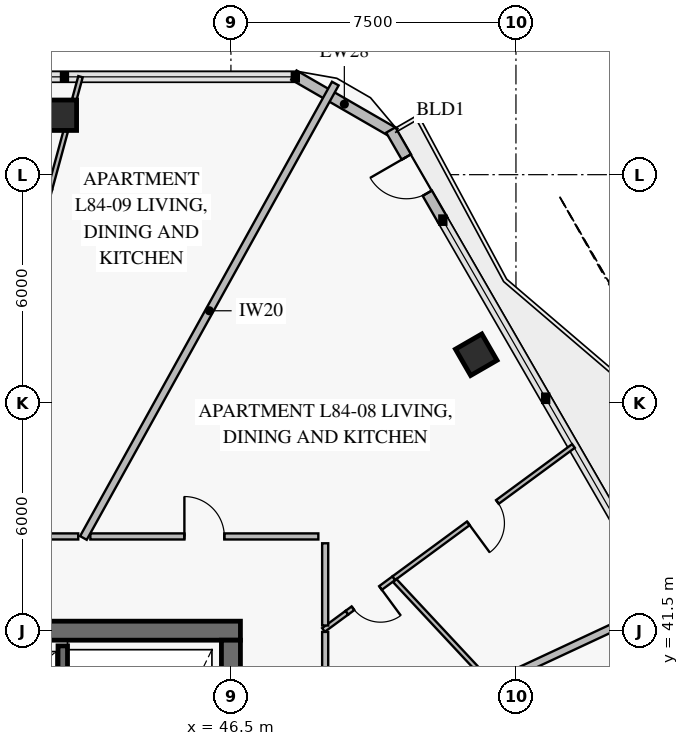
"""IFC4 building model, lengths in metres.
Left out: names, types, materials, properties, quantities, classifications, styles, units other than length and angle.
Written with IfcOpenShell. Run it as: python <this file> out.ifc"""

import sys

from ifc_helpers import new_model, si_unit, direction, frame, frame_2d, origin, origin_2d, place, context, subcontext, project, spatial, rectangle, extrude, element, fill, save


model = new_model("IFC4")
c1 = context("Model", 3, precision=1e-05, world=origin(), true_north=direction((0.0, 1.0)))
c2 = subcontext(c1, "Body", "Model", "MODEL_VIEW")
j1 = project(units=[si_unit("LENGTHUNIT", "METRE"), si_unit("PLANEANGLEUNIT", "RADIAN")], contexts=[c1])
p1 = place(None, origin())
s1 = spatial("IfcSite", under=j1, at=p1, CompositionType="ELEMENT")
p2 = place(p1, origin())
s2 = spatial("IfcBuilding", under=s1, at=p2, CompositionType="ELEMENT")
p3 = place(p2, frame((0.0, 0.0, 331.0)))
s3 = spatial("IfcBuildingStorey", under=s2, at=p3, CompositionType="ELEMENT", Elevation=331.0)
p4 = place(p3, frame((46.75, 41.5, 0.0), z_axis=(0.0, 0.0, 1.0), x_axis=(-1.0, 0.0, 0.0)))
e1 = element("IfcWall", 1, at=p4, inside=s3, PredefinedType="SHEAR", context=c2, shape_type="SweptSolid", body=[
    extrude(rectangle(XDim=7.8, YDim=0.5, at=frame_2d((3.9, 0.0))), origin(), (0.0, 0.0, 1.0), 3.8),
])
p5 = place(p3, frame((46.5, 22.75, 0.0), z_axis=(0.0, 0.0, 1.0), x_axis=(0.0, 1.0, 0.0)))
e2 = element("IfcWall", 2, at=p5, inside=s3, PredefinedType="SHEAR", context=c2, shape_type="SweptSolid", body=[
    extrude(rectangle(XDim=18.5, YDim=0.5, at=frame_2d((9.25, 0.0))), origin(), (0.0, 0.0, 1.0), 3.8),
])
p6 = place(p5, frame((9.0, 0.0, 0.0)))
e3 = element("IfcOpeningElement", 3, at=p6, cuts=e2, PredefinedType="OPENING", context=c2, shape_type="SweptSolid", body=[
    extrude(rectangle(XDim=1.1, YDim=2.15, at=frame_2d((0.55, 1.075))), frame((0.0, 0.262, 0.0), z_axis=(0.0, -1.0, 0.0), x_axis=(1.0, 0.0, 0.0)), (0.0, 0.0, 1.0), 0.524),
])
for number, where, z_axis, x_axis in (
    (4, (52.955, 48.762, 0.0), (0.0, 0.0, 1.0), (-0.5, 0.866, 0.0)),
    (5, (42.039, 55.064, 0.0), (0.0, 0.0, 1.0), (-1.0, 0.0, 0.0)),
):
    element("IfcColumn", number, at=place(p3, frame(where, z_axis=z_axis, x_axis=x_axis)), inside=s3, PredefinedType="COLUMN", context=c2, shape_type="SweptSolid", body=[
        extrude(rectangle(XDim=0.8, YDim=0.8, at=origin_2d()), origin(), (0.0, 0.0, 1.0), 3.55),
    ])
p7 = place(p3, frame((48.157, 56.122, 0.0), z_axis=(0.0, 0.0, 1.0), x_axis=(0.866023752521, -0.50000286006, 0.0)))
e6 = element("IfcWall", 6, at=p7, inside=s3, PredefinedType="SOLIDWALL", context=c2, shape_type="SweptSolid", body=[
    extrude(rectangle(XDim=3.065, YDim=0.28, at=frame_2d((1.532, 0.0))), origin(), (0.0, 0.0, 1.0), 3.55),
])
p8 = place(p3, frame((50.707, 54.676, 0.0), z_axis=(0.0, 0.0, 1.0), x_axis=(0.500031070095, -0.866007464714, 0.0)))
e7 = element("IfcWall", 7, at=p8, inside=s3, PredefinedType="SOLIDWALL", context=c2, shape_type="SweptSolid", body=[
    extrude(rectangle(XDim=2.739, YDim=0.28, at=frame_2d((1.37, 0.0))), origin(), (0.0, 0.0, 1.0), 3.55),
])
p9 = place(p8, frame((0.82, 0.0, 0.0)))
e8 = element("IfcOpeningElement", 8, at=p9, cuts=e7, PredefinedType="OPENING", context=c2, shape_type="SweptSolid", body=[
    extrude(rectangle(XDim=1.1, YDim=2.2, at=frame_2d((0.55, 1.1))), frame((0.0, 0.152, 0.0), z_axis=(0.0, -1.0, 0.0), x_axis=(1.0, 0.0, 0.0)), (0.0, 0.0, 1.0), 0.304),
])
p10 = place(p3, frame((42.075, 31.4, 0.0), z_axis=(0.0, 0.0, 1.0), x_axis=(0.0, 1.0, 0.0)))
e9 = element("IfcWall", 9, at=p10, inside=s3, PredefinedType="SOLIDWALL", context=c2, shape_type="SweptSolid", body=[
    extrude(rectangle(XDim=9.7, YDim=0.25, at=frame_2d((4.85, 0.0))), origin(), (0.0, 0.0, 1.0), 3.8),
])
p11 = place(p3, frame((49.55, 41.972, 0.0), z_axis=(0.0, 0.0, 1.0), x_axis=(0.805387500531, 0.592748660047, 0.0)))
e10 = element("IfcWall", 10, at=p11, inside=s3, PredefinedType="PARTITIONING", context=c2, shape_type="SweptSolid", body=[
    extrude(rectangle(XDim=1.535, YDim=0.12, at=frame_2d((0.768, 0.0))), origin(), (0.0, 0.0, 1.0), 3.2),
])
p12 = place(p11, frame((0.2, 0.0, 0.0)))
e11 = element("IfcOpeningElement", 11, at=p12, cuts=e10, PredefinedType="OPENING", context=c2, shape_type="SweptSolid", body=[
    extrude(rectangle(XDim=0.9, YDim=2.1, at=frame_2d((0.45, 1.05))), frame((0.0, 0.072, 0.0), z_axis=(0.0, -1.0, 0.0), x_axis=(1.0, 0.0, 0.0)), (0.0, 0.0, 1.0), 0.144),
])
p13 = place(p3, frame((50.786, 42.882, 0.0), z_axis=(0.0, 0.0, 1.0), x_axis=(0.805413284852, 0.592713624429, 0.0)))
e12 = element("IfcWall", 12, at=p13, inside=s3, PredefinedType="PARTITIONING", context=c2, shape_type="SweptSolid", body=[
    extrude(rectangle(XDim=5.869, YDim=0.12, at=frame_2d((2.935, 0.0))), origin(), (0.0, 0.0, 1.0), 2.97),
])
p14 = place(p13, frame((2.434, 0.0, 0.0)))
e13 = element("IfcOpeningElement", 13, at=p14, cuts=e12, PredefinedType="OPENING", context=c2, shape_type="SweptSolid", body=[
    extrude(rectangle(XDim=0.95, YDim=2.1, at=frame_2d((0.475, 1.05))), frame((0.0, 0.072, 0.0), z_axis=(0.0, -1.0, 0.0), x_axis=(1.0, 0.0, 0.0)), (0.0, 0.0, 1.0), 0.144),
])
p15 = place(p3, frame((48.8, 43.98, 0.0), z_axis=(0.0, 0.0, 1.0), x_axis=(-1.0, 0.0, 0.0)))
e14 = element("IfcWall", 14, at=p15, inside=s3, PredefinedType="PARTITIONING", context=c2, shape_type="SweptSolid", body=[
    extrude(rectangle(XDim=5.999, YDim=0.16, at=frame_2d((3.0, 0.0))), origin(), (0.0, 0.0, 1.0), 3.0),
])
p16 = place(p15, frame((2.475, 0.0, 0.0)))
e15 = element("IfcOpeningElement", 15, at=p16, cuts=e14, PredefinedType="OPENING", context=c2, shape_type="SweptSolid", body=[
    extrude(rectangle(XDim=1.05, YDim=2.15, at=frame_2d((0.525, 1.075))), frame((0.0, 0.092, 0.0), z_axis=(0.0, -1.0, 0.0), x_axis=(1.0, 0.0, 0.0)), (0.0, 0.0, 1.0), 0.184),
])
p17 = place(p3, frame((42.482, 43.98, 0.0), z_axis=(0.0, 0.0, 1.0), x_axis=(-1.0, 0.0, 0.0)))
e16 = element("IfcWall", 16, at=p17, inside=s3, PredefinedType="PARTITIONING", context=c2, shape_type="SweptSolid", body=[
    extrude(rectangle(XDim=3.206, YDim=0.16, at=frame_2d((1.603, 0.0))), origin(), (0.0, 0.0, 1.0), 3.55),
])
p18 = place(p17, frame((1.078, 0.0, 0.0)))
e17 = element("IfcOpeningElement", 17, at=p18, cuts=e16, PredefinedType="OPENING", context=c2, shape_type="SweptSolid", body=[
    extrude(rectangle(XDim=1.05, YDim=2.15, at=frame_2d((0.525, 1.075))), frame((0.0, 0.092, 0.0), z_axis=(0.0, -1.0, 0.0), x_axis=(1.0, 0.0, 0.0)), (0.0, 0.0, 1.0), 0.184),
])
p19 = place(p3, frame((48.94, 38.034, 0.0), z_axis=(0.0, 0.0, 1.0), x_axis=(0.906309881833, 0.422613769406, 0.0)))
e18 = element("IfcWall", 18, at=p19, inside=s3, PredefinedType="PARTITIONING", context=c2, shape_type="SweptSolid", body=[
    extrude(rectangle(XDim=9.888, YDim=0.2, at=frame_2d((4.944, 0.0))), origin(), (0.0, 0.0, 1.0), 2.97),
])
p20 = place(p3, frame((48.935, 41.519, 0.0), z_axis=(0.0, 0.0, 1.0), x_axis=(0.805377162159, 0.592762706885, 0.0)))
e19 = element("IfcWall", 19, at=p20, inside=s3, PredefinedType="PARTITIONING", context=c2, shape_type="SweptSolid", body=[
    extrude(rectangle(XDim=0.764, YDim=0.12, at=frame_2d((0.382, 0.0))), origin(), (0.0, 0.0, 1.0), 3.55),
])
p21 = place(p3, frame((53.276, 40.175, 0.0), z_axis=(0.0, 0.0, 1.0), x_axis=(-0.681968956902, 0.731381119405, 0.0)))
e20 = element("IfcWall", 20, at=p21, inside=s3, PredefinedType="PARTITIONING", context=c2, shape_type="SweptSolid", body=[
    extrude(rectangle(XDim=3.612, YDim=0.12, at=frame_2d((1.806, 0.0))), origin(), (0.0, 0.0, 1.0), 3.2),
])
p22 = place(p3, frame((42.618, 43.94, 0.0), z_axis=(0.0, 0.0, 1.0), x_axis=(0.484817892783, 0.874615121546, 0.0)))
e21 = element("IfcWall", 21, at=p22, inside=s3, PredefinedType="PARTITIONING", context=c2, shape_type="SweptSolid", body=[
    extrude(rectangle(XDim=13.671, YDim=0.2, at=frame_2d((6.836, 0.0))), origin(), (0.0, 0.0, 1.0), 2.97),
])
p23 = place(p3, frame((41.74, 53.127, 0.0), z_axis=(0.0, 0.0, 1.0), x_axis=(0.262250179099, 0.964999918944, 0.0)))
e22 = element("IfcWall", 22, at=p23, inside=s3, PredefinedType="PARTITIONING", context=c2, shape_type="SweptSolid", body=[
    extrude(rectangle(XDim=1.572, YDim=0.12, at=frame_2d((0.786, 0.0))), origin(), (0.0, 0.0, 1.0), 3.0),
])
p24 = place(p3, frame((42.381, 55.484, 0.0), z_axis=(0.0, 0.0, 1.0), x_axis=(0.262177554605, 0.965019652578, 0.0)))
e23 = element("IfcWall", 23, at=p24, inside=s3, PredefinedType="PARTITIONING", context=c2, shape_type="SweptSolid", body=[
    extrude(rectangle(XDim=0.615, YDim=0.12, at=frame_2d((0.308, 0.0))), origin(), (0.0, 0.0, 1.0), 3.55),
])
p25 = place(p3, frame((48.98, 41.637, 0.0), z_axis=(0.0, 0.0, 1.0), x_axis=(0.0, 1.0, 0.0)))
e24 = element("IfcWall", 24, at=p25, inside=s3, PredefinedType="PARTITIONING", context=c2, shape_type="SweptSolid", body=[
    extrude(rectangle(XDim=2.163, YDim=0.16, at=frame_2d((1.082, 0.0))), origin(), (0.0, 0.0, 1.0), 3.55),
])
p26 = place(p3, frame((48.98, 38.213, 0.0), z_axis=(0.0, 0.0, 1.0), x_axis=(0.0, 1.0, 0.0)))
e25 = element("IfcWall", 25, at=p26, inside=s3, PredefinedType="PARTITIONING", context=c2, shape_type="SweptSolid", body=[
    extrude(rectangle(XDim=3.254, YDim=0.16, at=frame_2d((1.627, 0.0))), origin(), (0.0, 0.0, 1.0), 3.55),
])
p27 = place(p9, frame((1.1, 0.0, 0.0), z_axis=(0.0, 0.0, 1.0), x_axis=(-1.0, 0.0, 0.0)))
e26 = element("IfcDoor", 26, at=p27, inside=s3, OperationType="SINGLE_SWING_RIGHT", PredefinedType="DOOR", context=c2, shape_type="SweptSolid", body=[
    extrude(rectangle(XDim=1.1, YDim=2.2, at=frame_2d((0.55, 1.1))), frame((0.0, 0.025, 0.0), z_axis=(0.0, -1.0, 0.0), x_axis=(1.0, 0.0, 0.0)), (0.0, 0.0, 1.0), 0.05),
])
fill(e8, e26)
p28 = place(p12, frame((0.9, 0.0, 0.0), z_axis=(0.0, 0.0, 1.0), x_axis=(-1.0, 0.0, 0.0)))
e27 = element("IfcDoor", 27, at=p28, inside=s3, OperationType="SINGLE_SWING_LEFT", PredefinedType="DOOR", context=c2, shape_type="SweptSolid", body=[
    extrude(rectangle(XDim=0.9, YDim=2.1, at=frame_2d((0.45, 1.05))), frame((0.0, 0.025, 0.0), z_axis=(0.0, -1.0, 0.0), x_axis=(1.0, 0.0, 0.0)), (0.0, 0.0, 1.0), 0.05),
])
fill(e11, e27)
p29 = place(p14, frame((0.95, 0.0, 0.0), z_axis=(0.0, 0.0, 1.0), x_axis=(-1.0, 0.0, 0.0)))
e28 = element("IfcDoor", 28, at=p29, inside=s3, OperationType="SINGLE_SWING_RIGHT", PredefinedType="DOOR", context=c2, shape_type="SweptSolid", body=[
    extrude(rectangle(XDim=0.95, YDim=2.1, at=frame_2d((0.475, 1.05))), frame((0.0, 0.025, 0.0), z_axis=(0.0, -1.0, 0.0), x_axis=(1.0, 0.0, 0.0)), (0.0, 0.0, 1.0), 0.05),
])
fill(e13, e28)
p30 = place(p16, frame((1.05, 0.0, 0.0), z_axis=(0.0, 0.0, 1.0), x_axis=(-1.0, 0.0, 0.0)))
e29 = element("IfcDoor", 29, at=p30, inside=s3, OperationType="SINGLE_SWING_LEFT", PredefinedType="DOOR", context=c2, shape_type="SweptSolid", body=[
    extrude(rectangle(XDim=1.05, YDim=2.15, at=frame_2d((0.525, 1.075))), frame((0.0, 0.025, 0.0), z_axis=(0.0, -1.0, 0.0), x_axis=(1.0, 0.0, 0.0)), (0.0, 0.0, 1.0), 0.05),
])
fill(e15, e29)
save(model, sys.argv[1])
